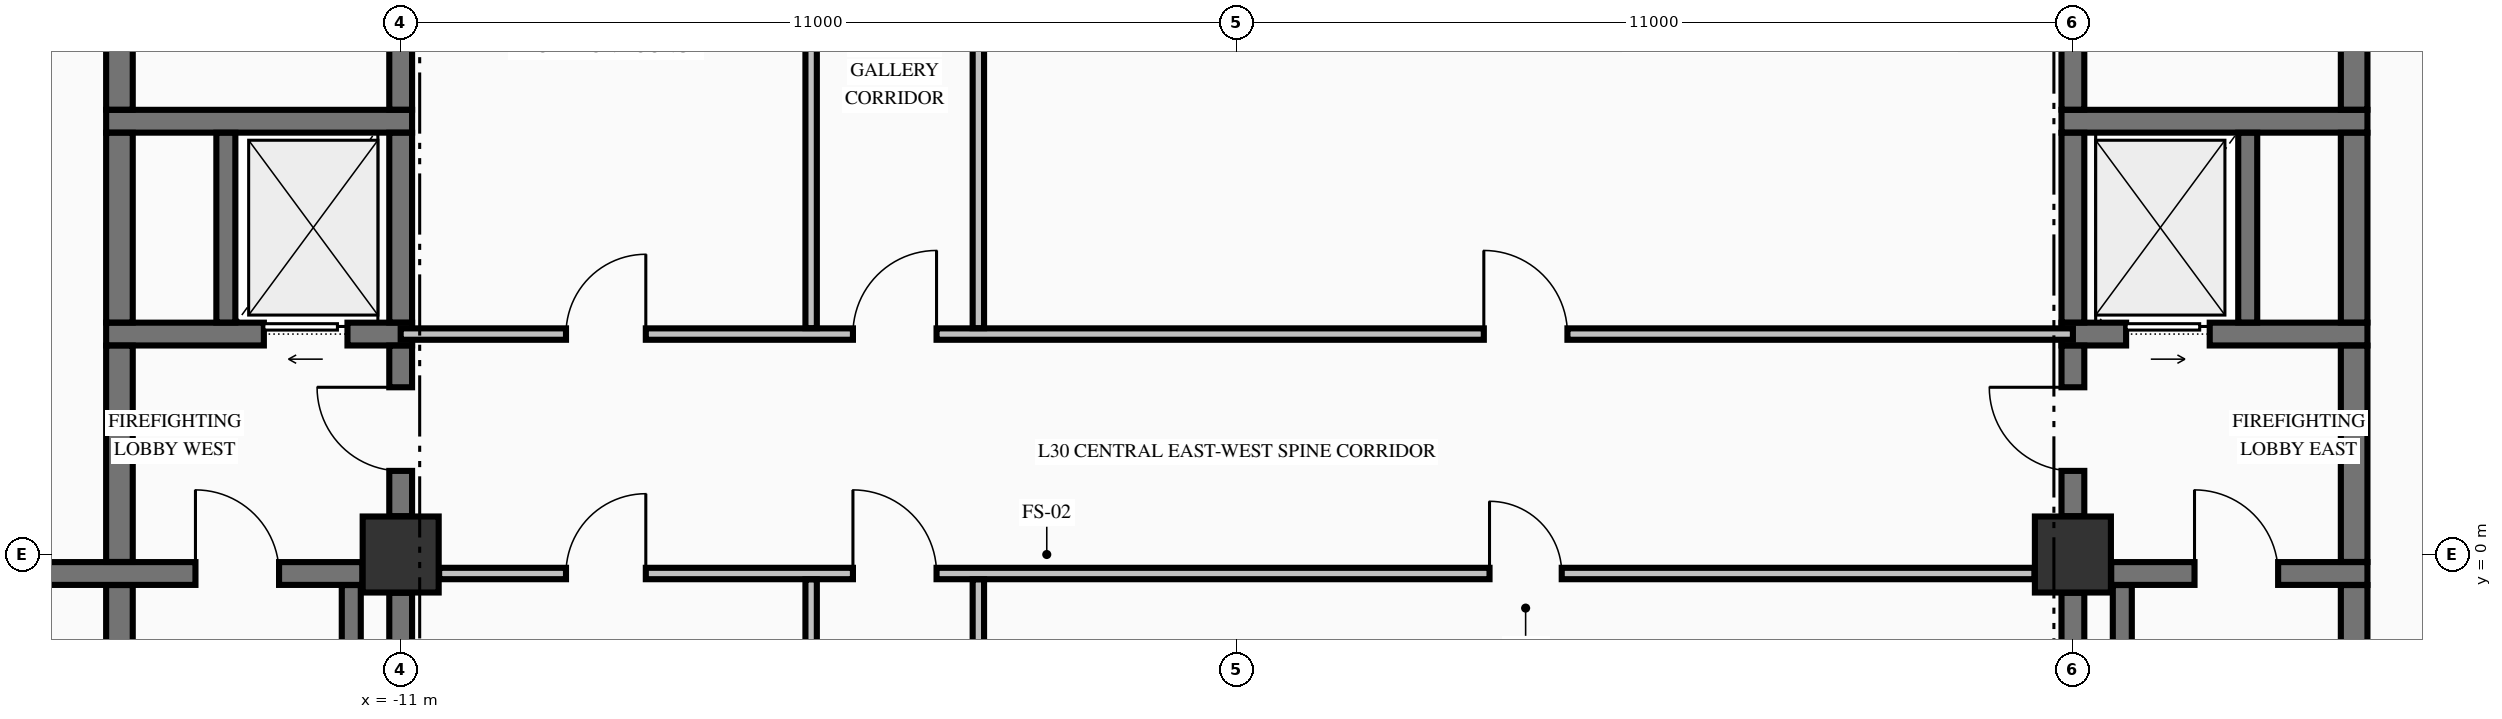
"""IFC4 building model, lengths in metres.
Left out: names, types, materials, properties, quantities, classifications, styles, units other than length and angle.
Written with IfcOpenShell. Run it as: python <this file> out.ifc"""

import sys

from ifc_helpers import new_model, si_unit, direction, frame, frame_2d, origin, origin_2d, place, context, subcontext, project, spatial, rectangle, extrude, element, fill, save


model = new_model("IFC4")
c1 = context("Model", 3, precision=1e-05, world=origin(), true_north=direction((0.0, 1.0)))
c2 = subcontext(c1, "Body", "Model", "MODEL_VIEW")
j1 = project(units=[si_unit("LENGTHUNIT", "METRE"), si_unit("PLANEANGLEUNIT", "RADIAN")], contexts=[c1])
p1 = place(None, origin())
s1 = spatial("IfcSite", under=j1, at=p1, CompositionType="ELEMENT")
p2 = place(p1, origin())
s2 = spatial("IfcBuilding", under=s1, at=p2, CompositionType="ELEMENT")
p3 = place(p2, frame((0.0, 0.0, 121.35)))
s3 = spatial("IfcBuildingStorey", under=s2, at=p3, CompositionType="ELEMENT", Elevation=121.35)
for number, where, z_axis, x_axis in (
    (1, (-11.0, 0.0, -0.425), (0.0, 0.0, 1.0), (1.0, 0.0, 0.0)),
    (2, (11.0, 0.0, -0.425), (0.0, 0.0, 1.0), (1.0, 0.0, 0.0)),
):
    element("IfcColumn", number, at=place(p3, frame(where, z_axis=z_axis, x_axis=x_axis)), inside=s3, PredefinedType="COLUMN", context=c2, shape_type="SweptSolid", body=[
        extrude(rectangle(XDim=1.0, YDim=1.0, at=origin_2d()), origin(), (0.0, 0.0, 1.0), 3.745),
    ])
p4 = place(p3, frame((-19.496, -0.25, 0.0), z_axis=(0.0, 0.0, 1.0), x_axis=(1.0, 0.0, 0.0)))
e3 = element("IfcWall", 3, at=p4, inside=s3, PredefinedType="SHEAR", context=c2, shape_type="SweptSolid", body=[
    extrude(rectangle(XDim=7.992, YDim=0.3, at=frame_2d((3.996, 0.0))), origin(), (0.0, 0.0, 1.0), 3.32),
])
p5 = place(p4, frame((5.796, 0.0, 0.0)))
e4 = element("IfcOpeningElement", 4, at=p5, cuts=e3, PredefinedType="OPENING", context=c2, shape_type="SweptSolid", body=[
    extrude(rectangle(XDim=1.1, YDim=2.15, at=frame_2d((0.55, 1.075))), frame((0.0, 0.16, 0.0), z_axis=(0.0, -1.0, 0.0), x_axis=(1.0, 0.0, 0.0)), (0.0, 0.0, 1.0), 0.32),
])
p6 = place(p3, frame((11.504, -0.25, 0.0), z_axis=(0.0, 0.0, 1.0), x_axis=(1.0, 0.0, 0.0)))
e5 = element("IfcWall", 5, at=p6, inside=s3, PredefinedType="SHEAR", context=c2, shape_type="SweptSolid", body=[
    extrude(rectangle(XDim=3.371, YDim=0.3, at=frame_2d((1.686, 0.0))), origin(), (0.0, 0.0, 1.0), 3.32),
])
p7 = place(p6, frame((1.096, 0.0, 0.0)))
e6 = element("IfcOpeningElement", 6, at=p7, cuts=e5, PredefinedType="OPENING", context=c2, shape_type="SweptSolid", body=[
    extrude(rectangle(XDim=1.1, YDim=2.15, at=frame_2d((0.55, 1.075))), frame((0.0, 0.16, 0.0), z_axis=(0.0, -1.0, 0.0), x_axis=(1.0, 0.0, 0.0)), (0.0, 0.0, 1.0), 0.32),
])
p8 = place(p3, frame((-14.875, 2.9, 0.0), z_axis=(0.0, 0.0, 1.0), x_axis=(1.0, 0.0, 0.0)))
e7 = element("IfcWall", 7, at=p8, inside=s3, PredefinedType="SHEAR", context=c2, shape_type="SweptSolid", body=[
    extrude(rectangle(XDim=4.025, YDim=0.3, at=frame_2d((2.012, 0.0))), origin(), (0.0, 0.0, 1.0), 3.32),
])
p9 = place(p8, frame((2.075, 0.0, 0.0)))
e8 = element("IfcOpeningElement", 8, at=p9, cuts=e7, PredefinedType="OPENING", context=c2, shape_type="SweptSolid", body=[
    extrude(rectangle(XDim=1.1, YDim=2.2, at=frame_2d((0.55, 1.1))), frame((0.0, 0.16, 0.0), z_axis=(0.0, -1.0, 0.0), x_axis=(1.0, 0.0, 0.0)), (0.0, 0.0, 1.0), 0.32),
])
p10 = place(p3, frame((10.85, 2.9, 0.0), z_axis=(0.0, 0.0, 1.0), x_axis=(1.0, 0.0, 0.0)))
e9 = element("IfcWall", 9, at=p10, inside=s3, PredefinedType="SHEAR", context=c2, shape_type="SweptSolid", body=[
    extrude(rectangle(XDim=4.025, YDim=0.3, at=frame_2d((2.012, 0.0))), origin(), (0.0, 0.0, 1.0), 3.32),
])
p11 = place(p10, frame((0.85, 0.0, 0.0)))
e10 = element("IfcOpeningElement", 10, at=p11, cuts=e9, PredefinedType="OPENING", context=c2, shape_type="SweptSolid", body=[
    extrude(rectangle(XDim=1.1, YDim=2.2, at=frame_2d((0.55, 1.1))), frame((0.0, 0.16, 0.0), z_axis=(0.0, -1.0, 0.0), x_axis=(1.0, 0.0, 0.0)), (0.0, 0.0, 1.0), 0.32),
])
for number, where, z_axis, x_axis in (
    (11, (-14.875, 5.7, 0.0), (0.0, 0.0, 1.0), (1.0, 0.0, 0.0)),
    (12, (10.85, 5.7, 0.0), (0.0, 0.0, 1.0), (1.0, 0.0, 0.0)),
):
    element("IfcWall", number, at=place(p3, frame(where, z_axis=z_axis, x_axis=x_axis)), inside=s3, PredefinedType="SHEAR", context=c2, shape_type="SweptSolid", body=[
        extrude(rectangle(XDim=4.025, YDim=0.3, at=frame_2d((2.012, 0.0))), origin(), (0.0, 0.0, 1.0), 3.32),
    ])
p12 = place(p3, frame((-10.494, -0.25, 0.0), z_axis=(0.0, 0.0, 1.0), x_axis=(1.0, 0.0, 0.0)))
e13 = element("IfcWall", 13, at=p12, inside=s3, PredefinedType="PARTITIONING", context=c2, shape_type="SweptSolid", body=[
    extrude(rectangle(XDim=20.988, YDim=0.15, at=frame_2d((10.494, 0.0))), origin(), (0.0, 0.0, 1.0), 3.32),
])
p13 = place(p12, frame((5.444, 0.0, 0.0)))
e14 = element("IfcOpeningElement", 14, at=p13, cuts=e13, PredefinedType="OPENING", context=c2, shape_type="SweptSolid", body=[
    extrude(rectangle(XDim=1.1, YDim=2.15, at=frame_2d((0.55, 1.075))), frame((0.0, 0.085, 0.0), z_axis=(0.0, -1.0, 0.0), x_axis=(1.0, 0.0, 0.0)), (0.0, 0.0, 1.0), 0.17),
])
p14 = place(p12, frame((1.669, 0.0, 0.0)))
e15 = element("IfcOpeningElement", 15, at=p14, cuts=e13, PredefinedType="OPENING", context=c2, shape_type="SweptSolid", body=[
    extrude(rectangle(XDim=1.05, YDim=2.15, at=frame_2d((0.525, 1.075))), frame((0.0, 0.085, 0.0), z_axis=(0.0, -1.0, 0.0), x_axis=(1.0, 0.0, 0.0)), (0.0, 0.0, 1.0), 0.17),
])
p15 = place(p12, frame((13.819, 0.0, 0.0)))
e16 = element("IfcOpeningElement", 16, at=p15, cuts=e13, PredefinedType="OPENING", context=c2, shape_type="SweptSolid", body=[
    extrude(rectangle(XDim=0.95, YDim=2.15, at=frame_2d((0.475, 1.075))), frame((0.0, 0.085, 0.0), z_axis=(0.0, -1.0, 0.0), x_axis=(1.0, 0.0, 0.0)), (0.0, 0.0, 1.0), 0.17),
])
p16 = place(p3, frame((-11.0, 2.9, 0.0), z_axis=(0.0, 0.0, 1.0), x_axis=(1.0, 0.0, 0.0)))
e17 = element("IfcWall", 17, at=p16, inside=s3, PredefinedType="PARTITIONING", context=c2, shape_type="SweptSolid", body=[
    extrude(rectangle(XDim=22.0, YDim=0.15, at=frame_2d((11.0, 0.0))), origin(), (0.0, 0.0, 1.0), 3.32),
])
p17 = place(p16, frame((5.95, 0.0, 0.0)))
e18 = element("IfcOpeningElement", 18, at=p17, cuts=e17, PredefinedType="OPENING", context=c2, shape_type="SweptSolid", body=[
    extrude(rectangle(XDim=1.1, YDim=2.15, at=frame_2d((0.55, 1.075))), frame((0.0, 0.085, 0.0), z_axis=(0.0, -1.0, 0.0), x_axis=(1.0, 0.0, 0.0)), (0.0, 0.0, 1.0), 0.17),
])
p18 = place(p16, frame((2.175, 0.0, 0.0)))
e19 = element("IfcOpeningElement", 19, at=p18, cuts=e17, PredefinedType="OPENING", context=c2, shape_type="SweptSolid", body=[
    extrude(rectangle(XDim=1.05, YDim=2.15, at=frame_2d((0.525, 1.075))), frame((0.0, 0.085, 0.0), z_axis=(0.0, -1.0, 0.0), x_axis=(1.0, 0.0, 0.0)), (0.0, 0.0, 1.0), 0.17),
])
p19 = place(p16, frame((14.25, 0.0, 0.0)))
e20 = element("IfcOpeningElement", 20, at=p19, cuts=e17, PredefinedType="OPENING", context=c2, shape_type="SweptSolid", body=[
    extrude(rectangle(XDim=1.1, YDim=2.15, at=frame_2d((0.55, 1.075))), frame((0.0, 0.085, 0.0), z_axis=(0.0, -1.0, 0.0), x_axis=(1.0, 0.0, 0.0)), (0.0, 0.0, 1.0), 0.17),
])
p20 = place(p3, frame((-14.7, -9.773, 0.0), z_axis=(0.0, 0.0, 1.0), x_axis=(0.0, 1.0, 0.0)))
e21 = element("IfcWall", 21, at=p20, inside=s3, PredefinedType="SHEAR", context=c2, shape_type="SweptSolid", body=[
    extrude(rectangle(XDim=9.371, YDim=0.35, at=frame_2d((4.686, 0.0))), origin(), (0.0, 0.0, 1.0), 3.32),
])
p21 = place(p3, frame((-14.7, -0.098, 0.0), z_axis=(0.0, 0.0, 1.0), x_axis=(0.0, 1.0, 0.0)))
e22 = element("IfcWall", 22, at=p21, inside=s3, PredefinedType="SHEAR", context=c2, shape_type="SweptSolid", body=[
    extrude(rectangle(XDim=2.846, YDim=0.35, at=frame_2d((1.423, 0.0))), origin(), (0.0, 0.0, 1.0), 3.32),
])
p22 = place(p3, frame((-14.7, 3.052, 0.0), z_axis=(0.0, 0.0, 1.0), x_axis=(0.0, 1.0, 0.0)))
e23 = element("IfcWall", 23, at=p22, inside=s3, PredefinedType="SHEAR", context=c2, shape_type="SweptSolid", body=[
    extrude(rectangle(XDim=2.496, YDim=0.35, at=frame_2d((1.248, 0.0))), origin(), (0.0, 0.0, 1.0), 3.32),
])
p23 = place(p3, frame((-14.7, 5.852, 0.0), z_axis=(0.0, 0.0, 1.0), x_axis=(0.0, 1.0, 0.0)))
e24 = element("IfcWall", 24, at=p23, inside=s3, PredefinedType="SHEAR", context=c2, shape_type="SweptSolid", body=[
    extrude(rectangle(XDim=4.471, YDim=0.35, at=frame_2d((2.235, 0.0))), origin(), (0.0, 0.0, 1.0), 3.32),
])
p24 = place(p3, frame((-13.3, 3.052, 0.0), z_axis=(0.0, 0.0, 1.0), x_axis=(0.0, 1.0, 0.0)))
e25 = element("IfcWall", 25, at=p24, inside=s3, PredefinedType="SOLIDWALL", context=c2, shape_type="SweptSolid", body=[
    extrude(rectangle(XDim=2.496, YDim=0.25, at=frame_2d((1.248, 0.0))), origin(), (0.0, 0.0, 1.0), 3.32),
])
p25 = place(p3, frame((-11.65, -9.798, 0.0), z_axis=(0.0, 0.0, 1.0), x_axis=(0.0, 1.0, 0.0)))
e26 = element("IfcWall", 26, at=p25, inside=s3, PredefinedType="SOLIDWALL", context=c2, shape_type="SweptSolid", body=[
    extrude(rectangle(XDim=9.396, YDim=0.25, at=frame_2d((4.698, 0.0))), origin(), (0.0, 0.0, 1.0), 3.32),
])
p26 = place(p3, frame((-11.0, -9.446, 0.0), z_axis=(0.0, 0.0, 1.0), x_axis=(0.0, 1.0, 0.0)))
e27 = element("IfcWall", 27, at=p26, inside=s3, PredefinedType="SHEAR", context=c2, shape_type="SweptSolid", body=[
    extrude(rectangle(XDim=8.942, YDim=0.3, at=frame_2d((4.471, 0.0))), origin(), (0.0, 0.0, 1.0), 3.32),
])
p27 = place(p3, frame((-11.0, 0.504, 0.0), z_axis=(0.0, 0.0, 1.0), x_axis=(0.0, 1.0, 0.0)))
e28 = element("IfcWall", 28, at=p27, inside=s3, PredefinedType="SHEAR", context=c2, shape_type="SweptSolid", body=[
    extrude(rectangle(XDim=2.244, YDim=0.3, at=frame_2d((1.122, 0.0))), origin(), (0.0, 0.0, 1.0), 3.32),
])
p28 = place(p27, frame((0.596, 0.0, 0.0)))
e29 = element("IfcOpeningElement", 29, at=p28, cuts=e28, PredefinedType="OPENING", context=c2, shape_type="SweptSolid", body=[
    extrude(rectangle(XDim=1.1, YDim=2.15, at=frame_2d((0.55, 1.075))), frame((0.0, 0.16, 0.0), z_axis=(0.0, -1.0, 0.0), x_axis=(1.0, 0.0, 0.0)), (0.0, 0.0, 1.0), 0.32),
])
p29 = place(p3, frame((-11.0, 3.052, 0.0), z_axis=(0.0, 0.0, 1.0), x_axis=(0.0, 1.0, 0.0)))
e30 = element("IfcWall", 30, at=p29, inside=s3, PredefinedType="SHEAR", context=c2, shape_type="SweptSolid", body=[
    extrude(rectangle(XDim=2.496, YDim=0.3, at=frame_2d((1.248, 0.0))), origin(), (0.0, 0.0, 1.0), 3.32),
])
p30 = place(p3, frame((-11.0, 5.852, 0.0), z_axis=(0.0, 0.0, 1.0), x_axis=(0.0, 1.0, 0.0)))
e31 = element("IfcWall", 31, at=p30, inside=s3, PredefinedType="SHEAR", context=c2, shape_type="SweptSolid", body=[
    extrude(rectangle(XDim=4.144, YDim=0.3, at=frame_2d((2.072, 0.0))), origin(), (0.0, 0.0, 1.0), 3.32),
])
p31 = place(p3, frame((11.0, -9.446, 0.0), z_axis=(0.0, 0.0, 1.0), x_axis=(0.0, 1.0, 0.0)))
e32 = element("IfcWall", 32, at=p31, inside=s3, PredefinedType="SHEAR", context=c2, shape_type="SweptSolid", body=[
    extrude(rectangle(XDim=8.942, YDim=0.3, at=frame_2d((4.471, 0.0))), origin(), (0.0, 0.0, 1.0), 3.32),
])
p32 = place(p3, frame((11.0, 0.504, 0.0), z_axis=(0.0, 0.0, 1.0), x_axis=(0.0, 1.0, 0.0)))
e33 = element("IfcWall", 33, at=p32, inside=s3, PredefinedType="SHEAR", context=c2, shape_type="SweptSolid", body=[
    extrude(rectangle(XDim=2.244, YDim=0.3, at=frame_2d((1.122, 0.0))), origin(), (0.0, 0.0, 1.0), 3.32),
])
p33 = place(p32, frame((0.596, 0.0, 0.0)))
e34 = element("IfcOpeningElement", 34, at=p33, cuts=e33, PredefinedType="OPENING", context=c2, shape_type="SweptSolid", body=[
    extrude(rectangle(XDim=1.1, YDim=2.15, at=frame_2d((0.55, 1.075))), frame((0.0, 0.16, 0.0), z_axis=(0.0, -1.0, 0.0), x_axis=(1.0, 0.0, 0.0)), (0.0, 0.0, 1.0), 0.32),
])
p34 = place(p3, frame((11.0, 3.052, 0.0), z_axis=(0.0, 0.0, 1.0), x_axis=(0.0, 1.0, 0.0)))
e35 = element("IfcWall", 35, at=p34, inside=s3, PredefinedType="SHEAR", context=c2, shape_type="SweptSolid", body=[
    extrude(rectangle(XDim=2.496, YDim=0.3, at=frame_2d((1.248, 0.0))), origin(), (0.0, 0.0, 1.0), 3.32),
])
p35 = place(p3, frame((11.0, 5.852, 0.0), z_axis=(0.0, 0.0, 1.0), x_axis=(0.0, 1.0, 0.0)))
e36 = element("IfcWall", 36, at=p35, inside=s3, PredefinedType="SHEAR", context=c2, shape_type="SweptSolid", body=[
    extrude(rectangle(XDim=4.144, YDim=0.3, at=frame_2d((2.072, 0.0))), origin(), (0.0, 0.0, 1.0), 3.32),
])
p36 = place(p3, frame((11.65, -9.798, 0.0), z_axis=(0.0, 0.0, 1.0), x_axis=(0.0, 1.0, 0.0)))
e37 = element("IfcWall", 37, at=p36, inside=s3, PredefinedType="SOLIDWALL", context=c2, shape_type="SweptSolid", body=[
    extrude(rectangle(XDim=9.396, YDim=0.25, at=frame_2d((4.698, 0.0))), origin(), (0.0, 0.0, 1.0), 3.32),
])
p37 = place(p3, frame((13.3, 3.052, 0.0), z_axis=(0.0, 0.0, 1.0), x_axis=(0.0, 1.0, 0.0)))
e38 = element("IfcWall", 38, at=p37, inside=s3, PredefinedType="SOLIDWALL", context=c2, shape_type="SweptSolid", body=[
    extrude(rectangle(XDim=2.496, YDim=0.25, at=frame_2d((1.248, 0.0))), origin(), (0.0, 0.0, 1.0), 3.32),
])
p38 = place(p3, frame((14.7, -9.773, 0.0), z_axis=(0.0, 0.0, 1.0), x_axis=(0.0, 1.0, 0.0)))
e39 = element("IfcWall", 39, at=p38, inside=s3, PredefinedType="SHEAR", context=c2, shape_type="SweptSolid", body=[
    extrude(rectangle(XDim=9.371, YDim=0.35, at=frame_2d((4.686, 0.0))), origin(), (0.0, 0.0, 1.0), 3.32),
])
p39 = place(p3, frame((14.7, -0.098, 0.0), z_axis=(0.0, 0.0, 1.0), x_axis=(0.0, 1.0, 0.0)))
e40 = element("IfcWall", 40, at=p39, inside=s3, PredefinedType="SHEAR", context=c2, shape_type="SweptSolid", body=[
    extrude(rectangle(XDim=2.846, YDim=0.35, at=frame_2d((1.423, 0.0))), origin(), (0.0, 0.0, 1.0), 3.32),
])
p40 = place(p3, frame((14.7, 3.052, 0.0), z_axis=(0.0, 0.0, 1.0), x_axis=(0.0, 1.0, 0.0)))
e41 = element("IfcWall", 41, at=p40, inside=s3, PredefinedType="SHEAR", context=c2, shape_type="SweptSolid", body=[
    extrude(rectangle(XDim=2.496, YDim=0.35, at=frame_2d((1.248, 0.0))), origin(), (0.0, 0.0, 1.0), 3.32),
])
p41 = place(p3, frame((14.7, 5.852, 0.0), z_axis=(0.0, 0.0, 1.0), x_axis=(0.0, 1.0, 0.0)))
e42 = element("IfcWall", 42, at=p41, inside=s3, PredefinedType="SHEAR", context=c2, shape_type="SweptSolid", body=[
    extrude(rectangle(XDim=4.471, YDim=0.35, at=frame_2d((2.235, 0.0))), origin(), (0.0, 0.0, 1.0), 3.32),
])
p42 = place(p3, frame((-5.6, -9.872, 0.0), z_axis=(0.0, 0.0, 1.0), x_axis=(0.0, 1.0, 0.0)))
e43 = element("IfcWall", 43, at=p42, inside=s3, PredefinedType="PARTITIONING", context=c2, shape_type="SweptSolid", body=[
    extrude(rectangle(XDim=9.544, YDim=0.15, at=frame_2d((4.772, 0.0))), origin(), (0.0, 0.0, 1.0), 3.32),
])
p43 = place(p3, frame((-5.6, 2.978, 0.0), z_axis=(0.0, 0.0, 1.0), x_axis=(0.0, 1.0, 0.0)))
e44 = element("IfcWall", 44, at=p43, inside=s3, PredefinedType="PARTITIONING", context=c2, shape_type="SweptSolid", body=[
    extrude(rectangle(XDim=7.444, YDim=0.15, at=frame_2d((3.722, 0.0))), origin(), (0.0, 0.0, 1.0), 3.32),
])
p44 = place(p3, frame((-3.4, -4.147, 0.0), z_axis=(0.0, 0.0, 1.0), x_axis=(0.0, 1.0, 0.0)))
e45 = element("IfcWall", 45, at=p44, inside=s3, PredefinedType="PARTITIONING", context=c2, shape_type="SweptSolid", body=[
    extrude(rectangle(XDim=3.819, YDim=0.15, at=frame_2d((1.91, 0.0))), origin(), (0.0, 0.0, 1.0), 3.32),
])
p45 = place(p3, frame((-3.4, 2.978, 0.0), z_axis=(0.0, 0.0, 1.0), x_axis=(0.0, 1.0, 0.0)))
e46 = element("IfcWall", 46, at=p45, inside=s3, PredefinedType="PARTITIONING", context=c2, shape_type="SweptSolid", body=[
    extrude(rectangle(XDim=7.444, YDim=0.15, at=frame_2d((3.722, 0.0))), origin(), (0.0, 0.0, 1.0), 3.32),
])
p46 = place(p5, origin())
e47 = element("IfcDoor", 47, at=p46, inside=s3, OperationType="SINGLE_SWING_LEFT", PredefinedType="DOOR", context=c2, shape_type="SweptSolid", body=[
    extrude(rectangle(XDim=1.1, YDim=2.15, at=frame_2d((0.55, 1.075))), frame((0.0, 0.025, 0.0), z_axis=(0.0, -1.0, 0.0), x_axis=(1.0, 0.0, 0.0)), (0.0, 0.0, 1.0), 0.05),
])
fill(e4, e47)
p47 = place(p28, origin())
e48 = element("IfcDoor", 48, at=p47, inside=s3, OperationType="SINGLE_SWING_RIGHT", PredefinedType="DOOR", context=c2, shape_type="SweptSolid", body=[
    extrude(rectangle(XDim=1.1, YDim=2.15, at=frame_2d((0.55, 1.075))), frame((0.0, 0.025, 0.0), z_axis=(0.0, -1.0, 0.0), x_axis=(1.0, 0.0, 0.0)), (0.0, 0.0, 1.0), 0.05),
])
fill(e29, e48)
p48 = place(p9, origin())
e49 = element("IfcDoor", 49, at=p48, inside=s3, OperationType="SLIDING_TO_LEFT", PredefinedType="DOOR", context=c2, shape_type="SweptSolid", body=[
    extrude(rectangle(XDim=1.1, YDim=2.2, at=frame_2d((0.55, 1.1))), frame((0.0, 0.025, 0.0), z_axis=(0.0, -1.0, 0.0), x_axis=(1.0, 0.0, 0.0)), (0.0, 0.0, 1.0), 0.05),
])
fill(e8, e49)
p49 = place(p7, origin())
e50 = element("IfcDoor", 50, at=p49, inside=s3, OperationType="SINGLE_SWING_LEFT", PredefinedType="DOOR", context=c2, shape_type="SweptSolid", body=[
    extrude(rectangle(XDim=1.1, YDim=2.15, at=frame_2d((0.55, 1.075))), frame((0.0, 0.025, 0.0), z_axis=(0.0, -1.0, 0.0), x_axis=(1.0, 0.0, 0.0)), (0.0, 0.0, 1.0), 0.05),
])
fill(e6, e50)
p50 = place(p33, origin())
e51 = element("IfcDoor", 51, at=p50, inside=s3, OperationType="SINGLE_SWING_RIGHT", PredefinedType="DOOR", context=c2, shape_type="SweptSolid", body=[
    extrude(rectangle(XDim=1.1, YDim=2.15, at=frame_2d((0.55, 1.075))), frame((0.0, 0.025, 0.0), z_axis=(0.0, -1.0, 0.0), x_axis=(1.0, 0.0, 0.0)), (0.0, 0.0, 1.0), 0.05),
])
fill(e34, e51)
p51 = place(p11, origin())
e52 = element("IfcDoor", 52, at=p51, inside=s3, OperationType="SLIDING_TO_RIGHT", PredefinedType="DOOR", context=c2, shape_type="SweptSolid", body=[
    extrude(rectangle(XDim=1.1, YDim=2.2, at=frame_2d((0.55, 1.1))), frame((0.0, 0.025, 0.0), z_axis=(0.0, -1.0, 0.0), x_axis=(1.0, 0.0, 0.0)), (0.0, 0.0, 1.0), 0.05),
])
fill(e10, e52)
p52 = place(p17, origin())
e53 = element("IfcDoor", 53, at=p52, inside=s3, OperationType="SINGLE_SWING_RIGHT", PredefinedType="DOOR", context=c2, shape_type="SweptSolid", body=[
    extrude(rectangle(XDim=1.1, YDim=2.15, at=frame_2d((0.55, 1.075))), frame((0.0, 0.025, 0.0), z_axis=(0.0, -1.0, 0.0), x_axis=(1.0, 0.0, 0.0)), (0.0, 0.0, 1.0), 0.05),
])
fill(e18, e53)
p53 = place(p13, origin())
e54 = element("IfcDoor", 54, at=p53, inside=s3, OperationType="SINGLE_SWING_LEFT", PredefinedType="DOOR", context=c2, shape_type="SweptSolid", body=[
    extrude(rectangle(XDim=1.1, YDim=2.15, at=frame_2d((0.55, 1.075))), frame((0.0, 0.025, 0.0), z_axis=(0.0, -1.0, 0.0), x_axis=(1.0, 0.0, 0.0)), (0.0, 0.0, 1.0), 0.05),
])
fill(e14, e54)
p54 = place(p18, origin())
e55 = element("IfcDoor", 55, at=p54, inside=s3, OperationType="SINGLE_SWING_RIGHT", PredefinedType="DOOR", context=c2, shape_type="SweptSolid", body=[
    extrude(rectangle(XDim=1.05, YDim=2.15, at=frame_2d((0.525, 1.075))), frame((0.0, 0.025, 0.0), z_axis=(0.0, -1.0, 0.0), x_axis=(1.0, 0.0, 0.0)), (0.0, 0.0, 1.0), 0.05),
])
fill(e19, e55)
p55 = place(p19, origin())
e56 = element("IfcDoor", 56, at=p55, inside=s3, OperationType="SINGLE_SWING_LEFT", PredefinedType="DOOR", context=c2, shape_type="SweptSolid", body=[
    extrude(rectangle(XDim=1.1, YDim=2.15, at=frame_2d((0.55, 1.075))), frame((0.0, 0.025, 0.0), z_axis=(0.0, -1.0, 0.0), x_axis=(1.0, 0.0, 0.0)), (0.0, 0.0, 1.0), 0.05),
])
fill(e20, e56)
p56 = place(p14, origin())
e57 = element("IfcDoor", 57, at=p56, inside=s3, OperationType="SINGLE_SWING_RIGHT", PredefinedType="DOOR", context=c2, shape_type="SweptSolid", body=[
    extrude(rectangle(XDim=1.05, YDim=2.15, at=frame_2d((0.525, 1.075))), frame((0.0, 0.025, 0.0), z_axis=(0.0, -1.0, 0.0), x_axis=(1.0, 0.0, 0.0)), (0.0, 0.0, 1.0), 0.05),
])
fill(e15, e57)
p57 = place(p15, origin())
e58 = element("IfcDoor", 58, at=p57, inside=s3, OperationType="SINGLE_SWING_LEFT", PredefinedType="DOOR", context=c2, shape_type="SweptSolid", body=[
    extrude(rectangle(XDim=0.95, YDim=2.15, at=frame_2d((0.475, 1.075))), frame((0.0, 0.025, 0.0), z_axis=(0.0, -1.0, 0.0), x_axis=(1.0, 0.0, 0.0)), (0.0, 0.0, 1.0), 0.05),
])
fill(e16, e58)
save(model, sys.argv[1])
